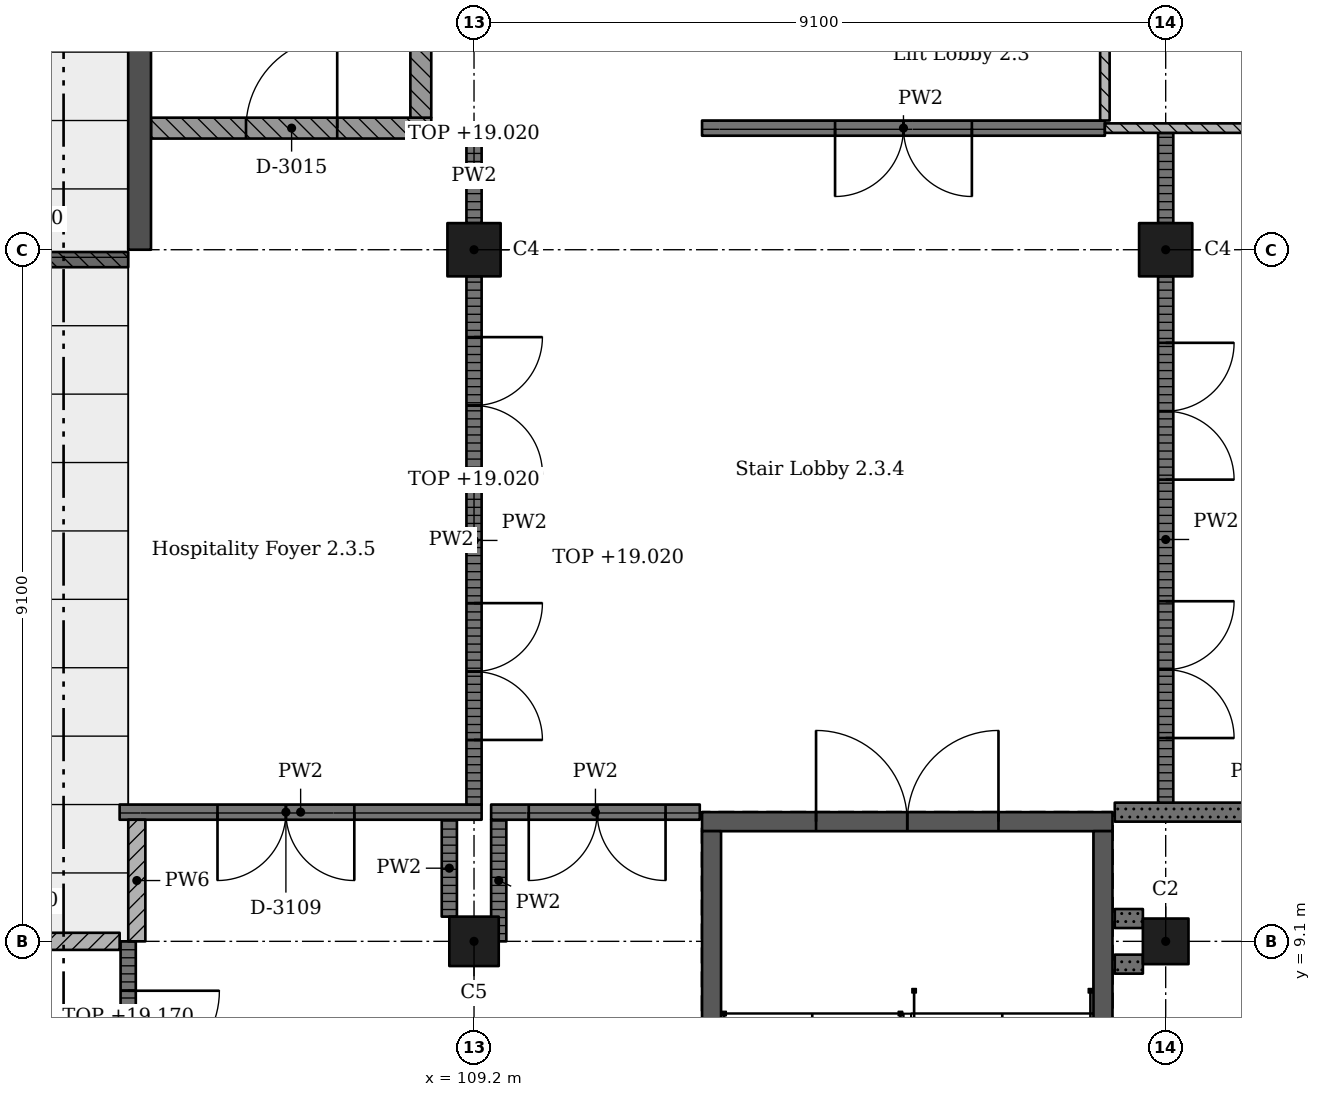
"""IFC4 building model, lengths in metres.
Left out: names, types, materials, properties, quantities, classifications, styles, units other than length and angle.
Written with IfcOpenShell. Run it as: python <this file> out.ifc"""

import sys

from ifc_helpers import new_model, si_unit, direction, frame, frame_2d, origin, origin_2d, place, context, subcontext, project, spatial, rectangle, extrude, element, fill, save


model = new_model("IFC4")
c1 = context("Model", 3, precision=1e-05, world=origin(), true_north=direction((0.0, 1.0)))
c2 = subcontext(c1, "Body", "Model", "MODEL_VIEW")
j1 = project(units=[si_unit("LENGTHUNIT", "METRE"), si_unit("PLANEANGLEUNIT", "RADIAN")], contexts=[c1])
p1 = place(None, origin())
s1 = spatial("IfcSite", under=j1, at=p1, CompositionType="ELEMENT")
p2 = place(p1, origin())
s2 = spatial("IfcBuilding", under=s1, at=p2, CompositionType="ELEMENT")
p3 = place(p2, frame((0.0, 0.0, 15.47)))
s3 = spatial("IfcBuildingStorey", under=s2, at=p3, CompositionType="ELEMENT", Elevation=15.47)
p4 = place(p3, frame((109.2, 9.1, 0.0), z_axis=(0.0, 0.0, 1.0), x_axis=(1.0, 0.0, 0.0)))
e1 = element("IfcColumn", 1, at=p4, inside=s3, PredefinedType="COLUMN", context=c2, shape_type="SweptSolid", body=[
    extrude(rectangle(XDim=0.65, YDim=0.65, at=origin_2d()), origin(), (0.0, 0.0, 1.0), 4.55),
])
p5 = place(p3, frame((109.2, 18.2, 0.0), z_axis=(0.0, 0.0, 1.0), x_axis=(1.0, 0.0, 0.0)))
e2 = element("IfcColumn", 2, at=p5, inside=s3, PredefinedType="COLUMN", context=c2, shape_type="SweptSolid", body=[
    extrude(rectangle(XDim=0.7, YDim=0.7, at=origin_2d()), origin(), (0.0, 0.0, 1.0), 4.55),
])
p6 = place(p3, frame((118.3, 9.1, 0.0), z_axis=(0.0, 0.0, 1.0), x_axis=(1.0, 0.0, 0.0)))
e3 = element("IfcColumn", 3, at=p6, inside=s3, PredefinedType="COLUMN", context=c2, shape_type="SweptSolid", body=[
    extrude(rectangle(XDim=0.6, YDim=0.6, at=origin_2d()), origin(), (0.0, 0.0, 1.0), 4.55),
])
p7 = place(p3, frame((118.3, 18.2, 0.0), z_axis=(0.0, 0.0, 1.0), x_axis=(1.0, 0.0, 0.0)))
e4 = element("IfcColumn", 4, at=p7, inside=s3, PredefinedType="COLUMN", context=c2, shape_type="SweptSolid", body=[
    extrude(rectangle(XDim=0.7, YDim=0.7, at=origin_2d()), origin(), (0.0, 0.0, 1.0), 4.55),
])
p8 = place(p3, frame((104.8, 40.95, 0.0), z_axis=(0.0, 0.0, 1.0), x_axis=(0.0, -1.0, 0.0)))
e5 = element("IfcWall", 5, at=p8, inside=s3, PredefinedType="SHEAR", context=c2, shape_type="SweptSolid", body=[
    extrude(rectangle(XDim=22.75, YDim=0.3, at=frame_2d((11.375, 0.0))), origin(), (0.0, 0.0, 1.0), 4.55),
])
p9 = place(p3, frame((117.6, 10.675, 0.0), z_axis=(0.0, 0.0, 1.0), x_axis=(-1.0, 0.0, 0.0)))
e6 = element("IfcWall", 6, at=p9, inside=s3, PredefinedType="SHEAR", context=c2, shape_type="SweptSolid", body=[
    extrude(rectangle(XDim=5.4, YDim=0.25, at=frame_2d((2.7, 0.0))), origin(), (0.0, 0.0, 1.0), 4.55),
])
p10 = place(p9, frame((1.5, 0.0, 0.0)))
e7 = element("IfcOpeningElement", 7, at=p10, cuts=e6, PredefinedType="OPENING", context=c2, shape_type="SweptSolid", body=[
    extrude(rectangle(XDim=2.4, YDim=2.1, at=frame_2d((1.2, 1.05))), frame((0.0, 0.135, 0.0), z_axis=(0.0, -1.0, 0.0), x_axis=(1.0, 0.0, 0.0)), (0.0, 0.0, 1.0), 0.27),
])
for number, where, z_axis, x_axis in (
    (8, (112.325, 10.55, 0.0), (0.0, 0.0, 1.0), (0.0, -1.0, 0.0)),
    (9, (117.475, 10.55, 0.0), (0.0, 0.0, 1.0), (0.0, -1.0, 0.0)),
):
    element("IfcWall", number, at=place(p3, frame(where, z_axis=z_axis, x_axis=x_axis)), inside=s3, PredefinedType="SHEAR", context=c2, shape_type="SweptSolid", body=[
        extrude(rectangle(XDim=9.6, YDim=0.25, at=frame_2d((4.8, 0.0))), origin(), (0.0, 0.0, 1.0), 4.55),
    ])
p11 = place(p3, frame((100.525, 9.1, 0.0), z_axis=(0.0, 0.0, 1.0), x_axis=(1.0, 0.0, 0.0)))
e10 = element("IfcWall", 10, at=p11, inside=s3, PredefinedType="PARTITIONING", context=c2, shape_type="SweptSolid", body=[
    extrude(rectangle(XDim=4.013, YDim=0.225, at=frame_2d((2.006, 0.0))), origin(), (0.0, 0.0, 1.0), 3.6),
])
p12 = place(p3, frame((104.65, 5.5, 0.0), z_axis=(0.0, 0.0, 1.0), x_axis=(0.0, 1.0, 0.0)))
e11 = element("IfcWall", 11, at=p12, inside=s3, PredefinedType="PARTITIONING", context=c2, shape_type="SweptSolid", body=[
    extrude(rectangle(XDim=3.6, YDim=0.2, at=frame_2d((1.8, 0.0))), origin(), (0.0, 0.0, 1.0), 3.7),
])
p13 = place(p12, frame((0.55, 0.0, 0.0)))
e12 = element("IfcOpeningElement", 12, at=p13, cuts=e11, PredefinedType="OPENING", context=c2, shape_type="SweptSolid", body=[
    extrude(rectangle(XDim=2.4, YDim=2.4, at=frame_2d((1.2, 1.2))), frame((0.0, 0.11, 0.0), z_axis=(0.0, -1.0, 0.0), x_axis=(1.0, 0.0, 0.0)), (0.0, 0.0, 1.0), 0.22),
])
p14 = place(p3, frame((104.763, 9.1, 0.0), z_axis=(0.0, 0.0, 1.0), x_axis=(0.0, 1.0, 0.0)))
e13 = element("IfcWall", 13, at=p14, inside=s3, PredefinedType="PARTITIONING", context=c2, shape_type="SweptSolid", body=[
    extrude(rectangle(XDim=1.6, YDim=0.225, at=frame_2d((0.8, 0.0))), origin(), (0.0, 0.0, 1.0), 4.3),
])
p15 = place(p3, frame((104.95, 19.8, 0.0), z_axis=(0.0, 0.0, 1.0), x_axis=(1.0, 0.0, 0.0)))
e14 = element("IfcWall", 14, at=p15, inside=s3, PredefinedType="SOLIDWALL", context=c2, shape_type="SweptSolid", body=[
    extrude(rectangle(XDim=3.688, YDim=0.275, at=frame_2d((1.844, 0.0))), origin(), (0.0, 0.0, 1.0), 4.3),
])
p16 = place(p15, frame((1.25, 0.0, 0.0)))
e15 = element("IfcOpeningElement", 15, at=p16, cuts=e14, PredefinedType="OPENING", context=c2, shape_type="SweptSolid", body=[
    extrude(rectangle(XDim=1.2, YDim=2.4, at=frame_2d((0.6, 1.2))), frame((0.0, 0.147, 0.0), z_axis=(0.0, -1.0, 0.0), x_axis=(1.0, 0.0, 0.0)), (0.0, 0.0, 1.0), 0.295),
])
p17 = place(p3, frame((108.5, 19.938, 0.0), z_axis=(0.0, 0.0, 1.0), x_axis=(0.0, 1.0, 0.0)))
e16 = element("IfcWall", 16, at=p17, inside=s3, PredefinedType="SOLIDWALL", context=c2, shape_type="SweptSolid", body=[
    extrude(rectangle(XDim=6.9, YDim=0.275, at=frame_2d((3.45, 0.0))), origin(), (0.0, 0.0, 1.0), 4.3),
])
p18 = place(p3, frame((108.875, 9.425, 0.0), z_axis=(0.0, 0.0, 1.0), x_axis=(0.0, 1.0, 0.0)))
e17 = element("IfcWall", 17, at=p18, inside=s3, PredefinedType="PARTITIONING", context=c2, shape_type="SweptSolid", body=[
    extrude(rectangle(XDim=1.275, YDim=0.2, at=frame_2d((0.637, 0.0))), origin(), (0.0, 0.0, 1.0), 4.3),
])
p19 = place(p3, frame((104.538, 10.8, 0.0), z_axis=(0.0, 0.0, 1.0), x_axis=(1.0, 0.0, 0.0)))
e18 = element("IfcWall", 18, at=p19, inside=s3, PredefinedType="PARTITIONING", context=c2, shape_type="SweptSolid", body=[
    extrude(rectangle(XDim=4.762, YDim=0.2, at=frame_2d((2.381, 0.0))), origin(), (0.0, 0.0, 1.0), 4.3),
])
p20 = place(p19, frame((1.288, 0.0, 0.0)))
e19 = element("IfcOpeningElement", 19, at=p20, cuts=e18, PredefinedType="OPENING", context=c2, shape_type="SweptSolid", body=[
    extrude(rectangle(XDim=1.8, YDim=2.4, at=frame_2d((0.9, 1.2))), frame((0.0, 0.11, 0.0), z_axis=(0.0, -1.0, 0.0), x_axis=(1.0, 0.0, 0.0)), (0.0, 0.0, 1.0), 0.22),
])
p21 = place(p3, frame((109.2, 10.9, 0.0), z_axis=(0.0, 0.0, 1.0), x_axis=(0.0, 1.0, 0.0)))
e20 = element("IfcWall", 20, at=p21, inside=s3, PredefinedType="PARTITIONING", context=c2, shape_type="SweptSolid", body=[
    extrude(rectangle(XDim=6.95, YDim=0.2, at=frame_2d((3.475, 0.0))), origin(), (0.0, 0.0, 1.0), 3.55),
])
p22 = place(p21, frame((0.85, 0.0, 0.0)))
e21 = element("IfcOpeningElement", 21, at=p22, cuts=e20, PredefinedType="OPENING", context=c2, shape_type="SweptSolid", body=[
    extrude(rectangle(XDim=1.8, YDim=2.4, at=frame_2d((0.9, 1.2))), frame((0.0, 0.11, 0.0), z_axis=(0.0, -1.0, 0.0), x_axis=(1.0, 0.0, 0.0)), (0.0, 0.0, 1.0), 0.22),
])
p23 = place(p21, frame((4.35, 0.0, 0.0)))
e22 = element("IfcOpeningElement", 22, at=p23, cuts=e20, PredefinedType="OPENING", context=c2, shape_type="SweptSolid", body=[
    extrude(rectangle(XDim=1.8, YDim=2.4, at=frame_2d((0.9, 1.2))), frame((0.0, 0.11, 0.0), z_axis=(0.0, -1.0, 0.0), x_axis=(1.0, 0.0, 0.0)), (0.0, 0.0, 1.0), 0.22),
])
p24 = place(p3, frame((109.2, 18.55, 0.0), z_axis=(0.0, 0.0, 1.0), x_axis=(0.0, 1.0, 0.0)))
e23 = element("IfcWall", 23, at=p24, inside=s3, PredefinedType="PARTITIONING", context=c2, shape_type="SweptSolid", body=[
    extrude(rectangle(XDim=1.25, YDim=0.2, at=frame_2d((0.625, 0.0))), origin(), (0.0, 0.0, 1.0), 3.55),
])
p25 = place(p3, frame((109.525, 9.1, 0.0), z_axis=(0.0, 0.0, 1.0), x_axis=(0.0, 1.0, 0.0)))
e24 = element("IfcWall", 24, at=p25, inside=s3, PredefinedType="PARTITIONING", context=c2, shape_type="SweptSolid", body=[
    extrude(rectangle(XDim=1.6, YDim=0.2, at=frame_2d((0.8, 0.0))), origin(), (0.0, 0.0, 1.0), 4.3),
])
p26 = place(p3, frame((112.17, 10.8, 0.0), z_axis=(0.0, 0.0, 1.0), x_axis=(-1.0, 0.0, 0.0)))
e25 = element("IfcWall", 25, at=p26, inside=s3, PredefinedType="PARTITIONING", context=c2, shape_type="SweptSolid", body=[
    extrude(rectangle(XDim=2.745, YDim=0.2, at=frame_2d((1.373, 0.0))), origin(), (0.0, 0.0, 1.0), 4.3),
])
p27 = place(p26, frame((0.45, 0.0, 0.0)))
e26 = element("IfcOpeningElement", 26, at=p27, cuts=e25, PredefinedType="OPENING", context=c2, shape_type="SweptSolid", body=[
    extrude(rectangle(XDim=1.8, YDim=2.4, at=frame_2d((0.9, 1.2))), frame((0.0, 0.11, 0.0), z_axis=(0.0, -1.0, 0.0), x_axis=(1.0, 0.0, 0.0)), (0.0, 0.0, 1.0), 0.22),
])
p28 = place(p3, frame((112.2, 19.8, 0.0), z_axis=(0.0, 0.0, 1.0), x_axis=(1.0, 0.0, 0.0)))
e27 = element("IfcWall", 27, at=p28, inside=s3, PredefinedType="PARTITIONING", context=c2, shape_type="SweptSolid", body=[
    extrude(rectangle(XDim=5.3, YDim=0.2, at=frame_2d((2.65, 0.0))), origin(), (0.0, 0.0, 1.0), 4.3),
])
p29 = place(p28, frame((1.75, 0.0, 0.0)))
e28 = element("IfcOpeningElement", 28, at=p29, cuts=e27, PredefinedType="OPENING", context=c2, shape_type="SweptSolid", body=[
    extrude(rectangle(XDim=1.8, YDim=2.4, at=frame_2d((0.9, 1.2))), frame((0.0, 0.11, 0.0), z_axis=(0.0, -1.0, 0.0), x_axis=(1.0, 0.0, 0.0)), (0.0, 0.0, 1.0), 0.22),
])
p30 = place(p3, frame((117.5, 19.8, 0.0), z_axis=(0.0, 0.0, 1.0), x_axis=(1.0, 0.0, 0.0)))
e29 = element("IfcWall", 29, at=p30, inside=s3, PredefinedType="PARTITIONING", context=c2, shape_type="SweptSolid", body=[
    extrude(rectangle(XDim=3.8, YDim=0.125, at=frame_2d((1.9, 0.0))), origin(), (0.0, 0.0, 1.0), 4.3),
])
p31 = place(p30, frame((1.85, 0.0, 0.0)))
e30 = element("IfcOpeningElement", 30, at=p31, cuts=e29, PredefinedType="OPENING", context=c2, shape_type="SweptSolid", body=[
    extrude(rectangle(XDim=0.9, YDim=2.1, at=frame_2d((0.45, 1.05))), frame((0.0, 0.073, 0.0), z_axis=(0.0, -1.0, 0.0), x_axis=(1.0, 0.0, 0.0)), (0.0, 0.0, 1.0), 0.145),
])
p32 = place(p3, frame((117.5, 19.9, 0.0), z_axis=(0.0, 0.0, 1.0), x_axis=(0.0, 1.0, 0.0)))
e31 = element("IfcWall", 31, at=p32, inside=s3, PredefinedType="PARTITIONING", context=c2, shape_type="SweptSolid", body=[
    extrude(rectangle(XDim=2.87, YDim=0.125, at=frame_2d((1.435, 0.0))), origin(), (0.0, 0.0, 1.0), 4.3),
])
for number, where, z_axis, x_axis in (
    (32, (117.63, 8.8, 0.0), (0.0, 0.0, 1.0), (1.0, 0.0, 0.0)),
    (33, (118.0, 9.4, 0.0), (0.0, 0.0, 1.0), (-1.0, 0.0, 0.0)),
):
    element("IfcWall", number, at=place(p3, frame(where, z_axis=z_axis, x_axis=x_axis)), inside=s3, PredefinedType="SOLIDWALL", context=c2, shape_type="SweptSolid", body=[
        extrude(rectangle(XDim=0.37, YDim=0.25, at=frame_2d((0.185, 0.0))), origin(), (0.0, 0.0, 1.0), 4.3),
    ])
p33 = place(p3, frame((117.63, 10.8, 0.0), z_axis=(0.0, 0.0, 1.0), x_axis=(1.0, 0.0, 0.0)))
e34 = element("IfcWall", 34, at=p33, inside=s3, PredefinedType="SOLIDWALL", context=c2, shape_type="SweptSolid", body=[
    extrude(rectangle(XDim=3.64, YDim=0.25, at=frame_2d((1.82, 0.0))), origin(), (0.0, 0.0, 1.0), 4.3),
])
p34 = place(p33, frame((1.69, 0.0, 0.0)))
e35 = element("IfcOpeningElement", 35, at=p34, cuts=e34, PredefinedType="OPENING", context=c2, shape_type="SweptSolid", body=[
    extrude(rectangle(XDim=1.0, YDim=2.1, at=frame_2d((0.5, 1.05))), frame((0.0, 0.135, 0.0), z_axis=(0.0, -1.0, 0.0), x_axis=(1.0, 0.0, 0.0)), (0.0, 0.0, 1.0), 0.27),
])
p35 = place(p3, frame((118.3, 10.925, 0.0), z_axis=(0.0, 0.0, 1.0), x_axis=(0.0, 1.0, 0.0)))
e36 = element("IfcWall", 36, at=p35, inside=s3, PredefinedType="PARTITIONING", context=c2, shape_type="SweptSolid", body=[
    extrude(rectangle(XDim=6.925, YDim=0.2, at=frame_2d((3.462, 0.0))), origin(), (0.0, 0.0, 1.0), 3.55),
])
p36 = place(p35, frame((0.85, 0.0, 0.0)))
e37 = element("IfcOpeningElement", 37, at=p36, cuts=e36, PredefinedType="OPENING", context=c2, shape_type="SweptSolid", body=[
    extrude(rectangle(XDim=1.8, YDim=2.4, at=frame_2d((0.9, 1.2))), frame((0.0, 0.11, 0.0), z_axis=(0.0, -1.0, 0.0), x_axis=(1.0, 0.0, 0.0)), (0.0, 0.0, 1.0), 0.22),
])
p37 = place(p35, frame((4.25, 0.0, 0.0)))
e38 = element("IfcOpeningElement", 38, at=p37, cuts=e36, PredefinedType="OPENING", context=c2, shape_type="SweptSolid", body=[
    extrude(rectangle(XDim=1.8, YDim=2.4, at=frame_2d((0.9, 1.2))), frame((0.0, 0.11, 0.0), z_axis=(0.0, -1.0, 0.0), x_axis=(1.0, 0.0, 0.0)), (0.0, 0.0, 1.0), 0.22),
])
p38 = place(p3, frame((118.3, 18.55, 0.0), z_axis=(0.0, 0.0, 1.0), x_axis=(0.0, 1.0, 0.0)))
e39 = element("IfcWall", 39, at=p38, inside=s3, PredefinedType="PARTITIONING", context=c2, shape_type="SweptSolid", body=[
    extrude(rectangle(XDim=1.188, YDim=0.2, at=frame_2d((0.594, 0.0))), origin(), (0.0, 0.0, 1.0), 3.55),
])
p39 = place(p3, frame((100.4, 18.07, 0.0), z_axis=(0.0, 0.0, 1.0), x_axis=(1.0, 0.0, 0.0)))
e40 = element("IfcWall", 40, at=p39, inside=s3, PredefinedType="PARTITIONING", context=c2, shape_type="SweptSolid", body=[
    extrude(rectangle(XDim=4.25, YDim=0.2, at=frame_2d((2.125, 0.0))), origin(), (0.0, 0.0, 1.0), 2.91),
])
p40 = place(p39, frame((1.125, 0.0, 1.1)))
e41 = element("IfcOpeningElement", 41, at=p40, cuts=e40, PredefinedType="OPENING", context=c2, shape_type="SweptSolid", body=[
    extrude(rectangle(XDim=2.0, YDim=1.3, at=frame_2d((1.0, 0.65))), frame((0.0, 0.11, 0.0), z_axis=(0.0, -1.0, 0.0), x_axis=(1.0, 0.0, 0.0)), (0.0, 0.0, 1.0), 0.22),
])
p41 = place(p16, origin())
e42 = element("IfcDoor", 42, at=p41, inside=s3, OperationType="SINGLE_SWING_LEFT", PredefinedType="DOOR", context=c2, shape_type="SweptSolid", body=[
    extrude(rectangle(XDim=1.2, YDim=2.4, at=frame_2d((0.6, 1.2))), frame((0.0, 0.025, 0.0), z_axis=(0.0, -1.0, 0.0), x_axis=(1.0, 0.0, 0.0)), (0.0, 0.0, 1.0), 0.05),
])
fill(e15, e42)
p42 = place(p36, origin())
e43 = element("IfcDoor", 43, at=p42, inside=s3, OperationType="DOUBLE_DOOR_SINGLE_SWING", PredefinedType="DOOR", context=c2, shape_type="SweptSolid", body=[
    extrude(rectangle(XDim=1.8, YDim=2.4, at=frame_2d((0.9, 1.2))), frame((0.0, 0.025, 0.0), z_axis=(0.0, -1.0, 0.0), x_axis=(1.0, 0.0, 0.0)), (0.0, 0.0, 1.0), 0.05),
])
fill(e37, e43)
p43 = place(p37, origin())
e44 = element("IfcDoor", 44, at=p43, inside=s3, OperationType="DOUBLE_DOOR_SINGLE_SWING", PredefinedType="DOOR", context=c2, shape_type="SweptSolid", body=[
    extrude(rectangle(XDim=1.8, YDim=2.4, at=frame_2d((0.9, 1.2))), frame((0.0, 0.025, 0.0), z_axis=(0.0, -1.0, 0.0), x_axis=(1.0, 0.0, 0.0)), (0.0, 0.0, 1.0), 0.05),
])
fill(e38, e44)
p44 = place(p22, origin())
e45 = element("IfcDoor", 45, at=p44, inside=s3, OperationType="DOUBLE_DOOR_SINGLE_SWING", PredefinedType="DOOR", context=c2, shape_type="SweptSolid", body=[
    extrude(rectangle(XDim=1.8, YDim=2.4, at=frame_2d((0.9, 1.2))), frame((0.0, 0.025, 0.0), z_axis=(0.0, -1.0, 0.0), x_axis=(1.0, 0.0, 0.0)), (0.0, 0.0, 1.0), 0.05),
])
fill(e21, e45)
p45 = place(p23, origin())
e46 = element("IfcDoor", 46, at=p45, inside=s3, OperationType="DOUBLE_DOOR_SINGLE_SWING", PredefinedType="DOOR", context=c2, shape_type="SweptSolid", body=[
    extrude(rectangle(XDim=1.8, YDim=2.4, at=frame_2d((0.9, 1.2))), frame((0.0, 0.025, 0.0), z_axis=(0.0, -1.0, 0.0), x_axis=(1.0, 0.0, 0.0)), (0.0, 0.0, 1.0), 0.05),
])
fill(e22, e46)
p46 = place(p29, origin())
e47 = element("IfcDoor", 47, at=p46, inside=s3, OperationType="DOUBLE_DOOR_SINGLE_SWING", PredefinedType="DOOR", context=c2, shape_type="SweptSolid", body=[
    extrude(rectangle(XDim=1.8, YDim=2.4, at=frame_2d((0.9, 1.2))), frame((0.0, 0.025, 0.0), z_axis=(0.0, -1.0, 0.0), x_axis=(1.0, 0.0, 0.0)), (0.0, 0.0, 1.0), 0.05),
])
fill(e28, e47)
p47 = place(p27, origin())
e48 = element("IfcDoor", 48, at=p47, inside=s3, OperationType="DOUBLE_DOOR_SINGLE_SWING", PredefinedType="DOOR", context=c2, shape_type="SweptSolid", body=[
    extrude(rectangle(XDim=1.8, YDim=2.4, at=frame_2d((0.9, 1.2))), frame((0.0, 0.025, 0.0), z_axis=(0.0, -1.0, 0.0), x_axis=(1.0, 0.0, 0.0)), (0.0, 0.0, 1.0), 0.05),
])
fill(e26, e48)
p48 = place(p20, origin())
e49 = element("IfcDoor", 49, at=p48, inside=s3, OperationType="DOUBLE_DOOR_SINGLE_SWING", PredefinedType="DOOR", context=c2, shape_type="SweptSolid", body=[
    extrude(rectangle(XDim=1.8, YDim=2.4, at=frame_2d((0.9, 1.2))), frame((0.0, 0.025, 0.0), z_axis=(0.0, -1.0, 0.0), x_axis=(1.0, 0.0, 0.0)), (0.0, 0.0, 1.0), 0.05),
])
fill(e19, e49)
p49 = place(p13, origin())
e50 = element("IfcDoor", 50, at=p49, inside=s3, OperationType="DOUBLE_DOOR_SINGLE_SWING", PredefinedType="DOOR", context=c2, shape_type="SweptSolid", body=[
    extrude(rectangle(XDim=2.4, YDim=2.4, at=frame_2d((1.2, 1.2))), frame((0.0, 0.025, 0.0), z_axis=(0.0, -1.0, 0.0), x_axis=(1.0, 0.0, 0.0)), (0.0, 0.0, 1.0), 0.05),
])
fill(e12, e50)
p50 = place(p10, origin())
e51 = element("IfcDoor", 51, at=p50, inside=s3, OperationType="DOUBLE_DOOR_SINGLE_SWING", PredefinedType="DOOR", context=c2, shape_type="SweptSolid", body=[
    extrude(rectangle(XDim=2.4, YDim=2.1, at=frame_2d((1.2, 1.05))), frame((0.0, 0.025, 0.0), z_axis=(0.0, -1.0, 0.0), x_axis=(1.0, 0.0, 0.0)), (0.0, 0.0, 1.0), 0.05),
])
fill(e7, e51)
save(model, sys.argv[1])
